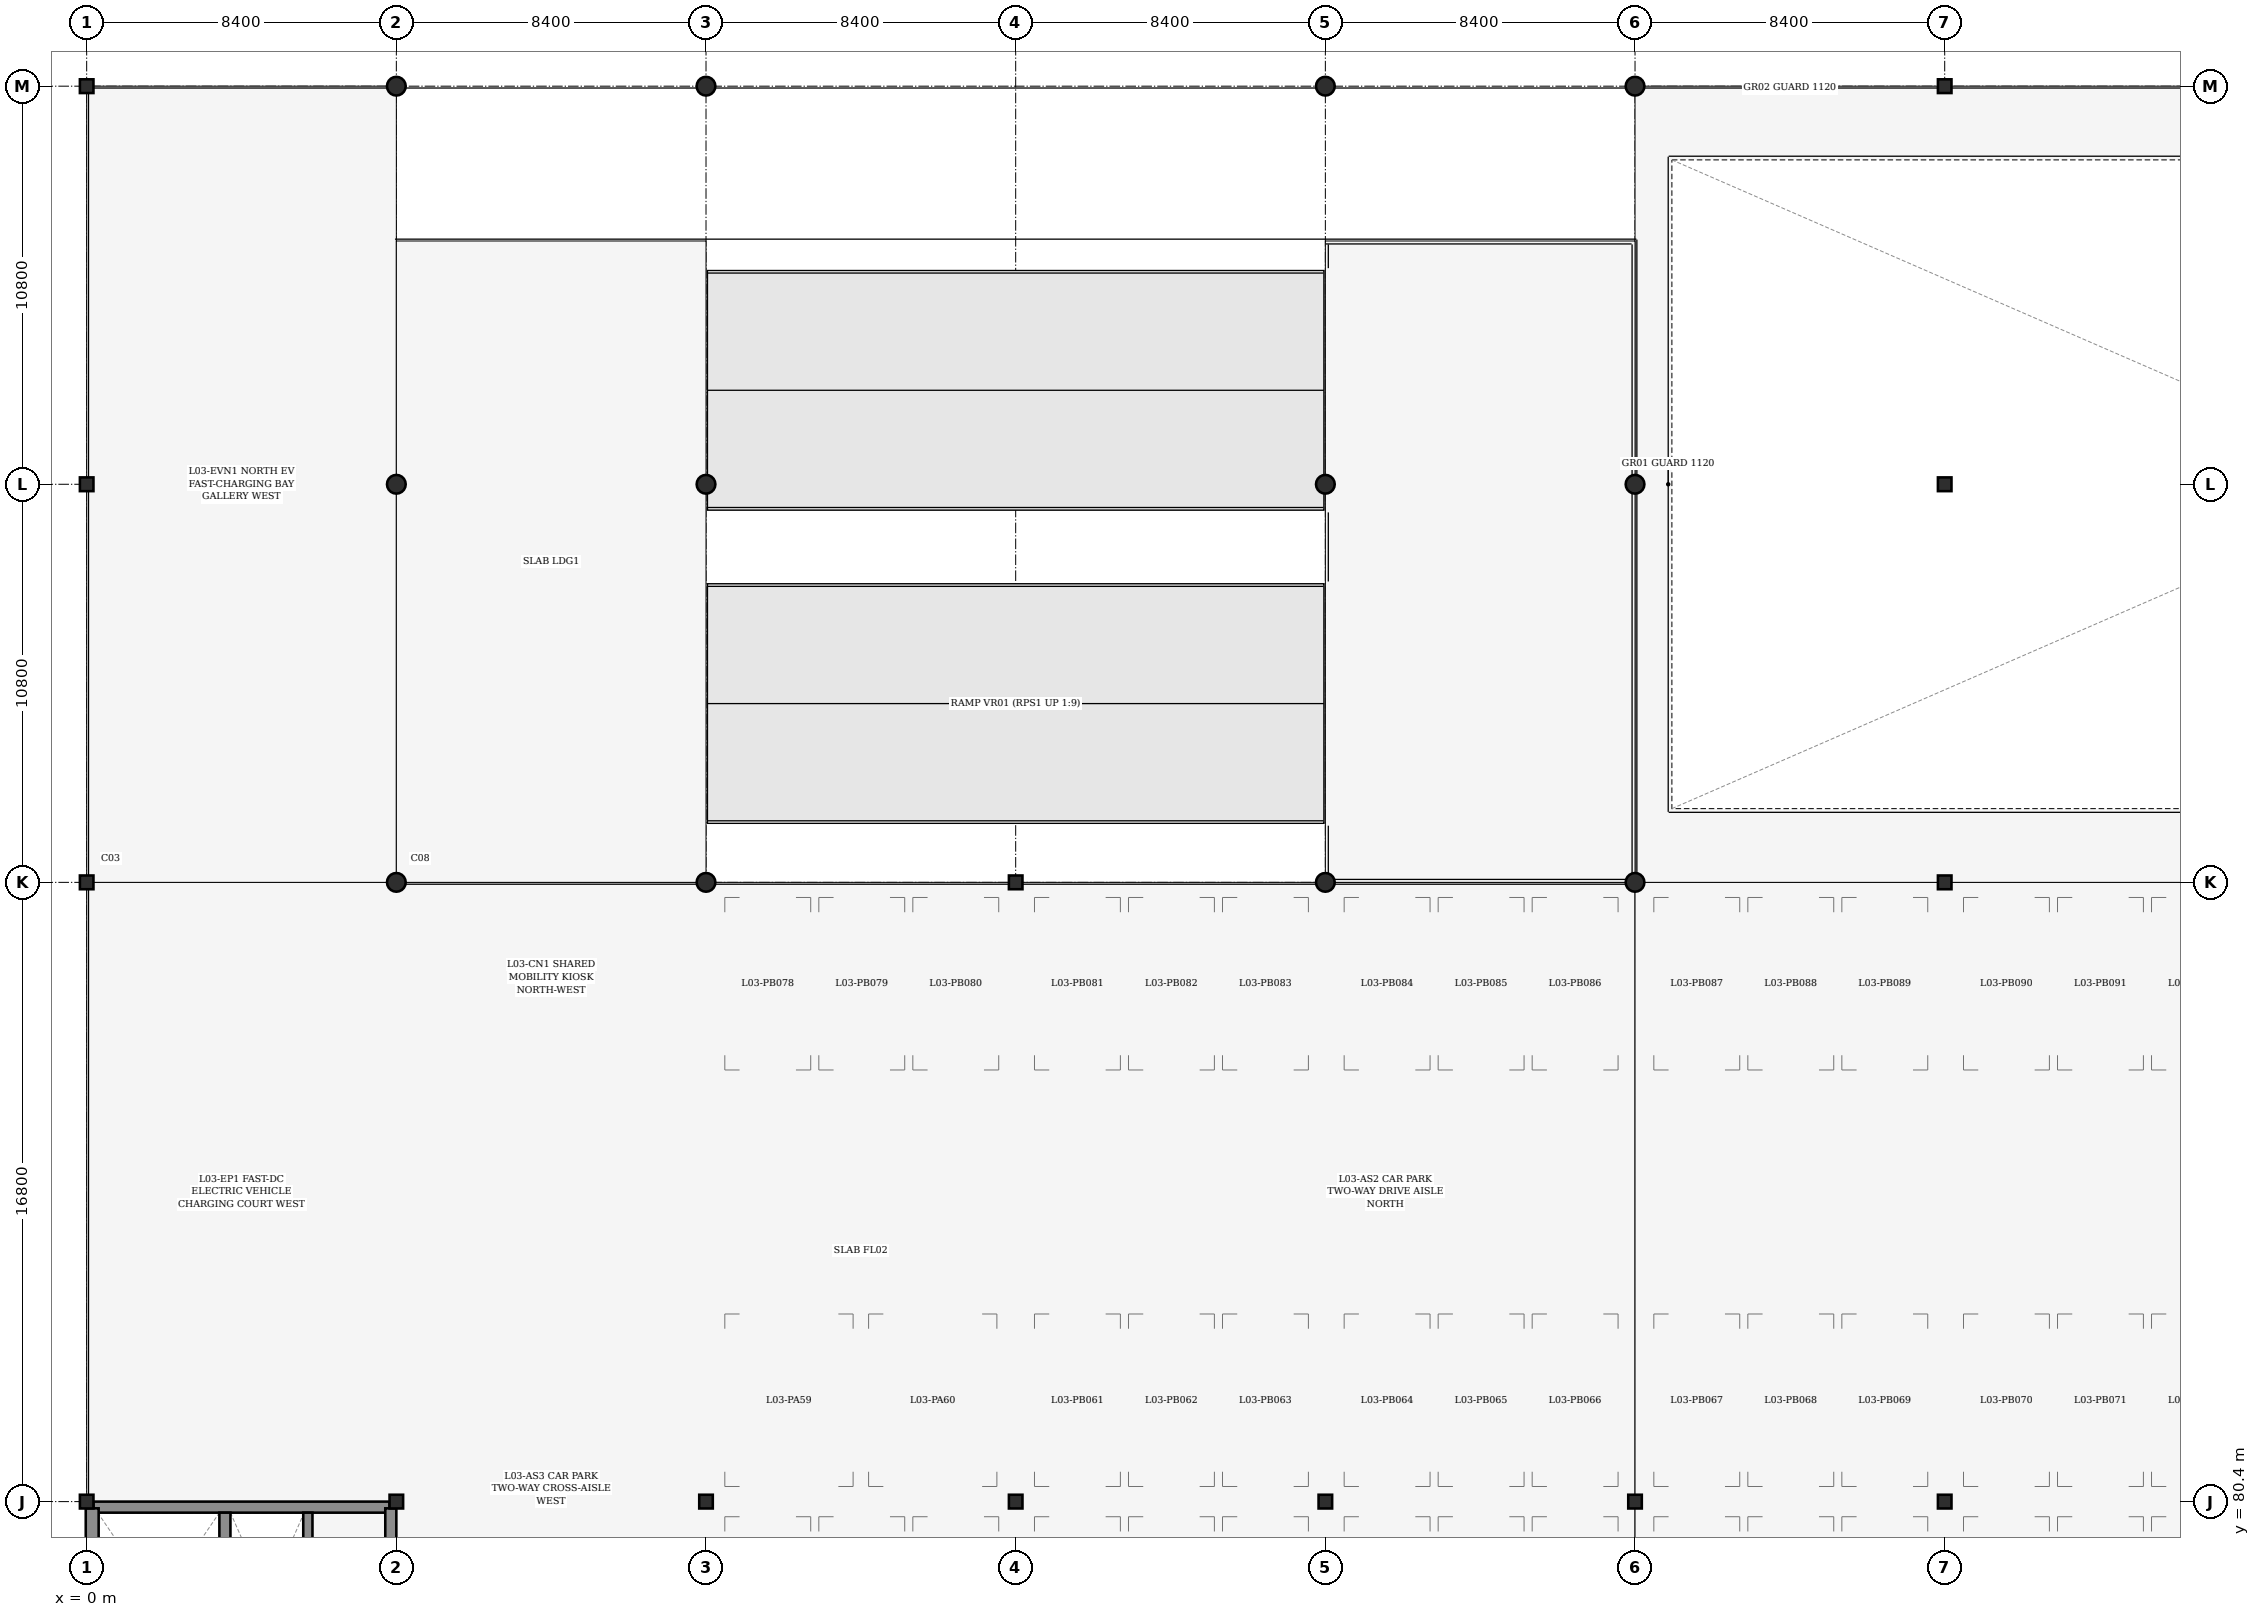
"""IFC4 building model, lengths in metres.
Left out: names, types, materials, properties, quantities, classifications, styles, units other than length and angle.
Written with IfcOpenShell. Run it as: python <this file> out.ifc"""

import sys

from ifc_helpers import new_model, si_unit, direction, frame, frame_2d, origin, origin_2d, place, context, subcontext, project, spatial, rectangle, hollow_circle, i_section, extrude, element, save


model = new_model("IFC4")
c1 = context("Model", 3, precision=1e-05, world=origin(), true_north=direction((0.0, 1.0)))
c2 = subcontext(c1, "Body", "Model", "MODEL_VIEW")
j1 = project(units=[si_unit("LENGTHUNIT", "METRE"), si_unit("PLANEANGLEUNIT", "RADIAN")], contexts=[c1])
p1 = place(None, origin())
s1 = spatial("IfcSite", under=j1, at=p1, CompositionType="ELEMENT")
p2 = place(p1, origin())
s2 = spatial("IfcBuilding", under=s1, at=p2, CompositionType="ELEMENT")
p3 = place(p2, frame((0.0, 0.0, 12.6)))
s3 = spatial("IfcBuildingStorey", under=s2, at=p3, CompositionType="ELEMENT", Elevation=12.6)
for number, where, z_axis, x_axis in (
    (1, (0.0, 80.4, 0.0), (0.0, 0.0, 1.0), (1.0, 0.0, 0.0)),
    (2, (0.0, 97.2, 0.0), (0.0, 0.0, 1.0), (1.0, 0.0, 0.0)),
    (3, (0.0, 108.0, 0.0), (0.0, 0.0, 1.0), (1.0, 0.0, 0.0)),
    (4, (0.0, 118.8, 0.0), (0.0, 0.0, 1.0), (1.0, 0.0, 0.0)),
    (5, (8.4, 80.4, 0.0), (0.0, 0.0, 1.0), (1.0, 0.0, 0.0)),
):
    element("IfcColumn", number, at=place(p3, frame(where, z_axis=z_axis, x_axis=x_axis)), inside=s3, PredefinedType="COLUMN", context=c2, shape_type="SweptSolid", body=[
        extrude(i_section(OverallWidth=0.373, OverallDepth=0.368, WebThickness=0.014, FlangeThickness=0.024, FilletRadius=0.015, at=origin_2d()), origin(), (0.0, 0.0, 1.0), 3.6),
    ])
for number, where, z_axis, x_axis in (
    (6, (8.4, 97.2, 0.0), (0.0, 0.0, 1.0), (1.0, 0.0, 0.0)),
    (7, (8.4, 108.0, 0.0), (0.0, 0.0, 1.0), (1.0, 0.0, 0.0)),
    (8, (8.4, 118.8, 0.0), (0.0, 0.0, 1.0), (1.0, 0.0, 0.0)),
):
    element("IfcColumn", number, at=place(p3, frame(where, z_axis=z_axis, x_axis=x_axis)), inside=s3, PredefinedType="COLUMN", context=c2, shape_type="SweptSolid", body=[
        extrude(hollow_circle(Radius=0.254, WallThickness=0.016, at=origin_2d()), origin(), (0.0, 0.0, 1.0), 3.6),
    ])
p4 = place(p3, frame((16.8, 80.4, 0.0), z_axis=(0.0, 0.0, 1.0), x_axis=(1.0, 0.0, 0.0)))
e9 = element("IfcColumn", 9, at=p4, inside=s3, PredefinedType="COLUMN", context=c2, shape_type="SweptSolid", body=[
    extrude(i_section(OverallWidth=0.373, OverallDepth=0.368, WebThickness=0.014, FlangeThickness=0.024, FilletRadius=0.015, at=origin_2d()), origin(), (0.0, 0.0, 1.0), 3.6),
])
for number, where, z_axis, x_axis in (
    (10, (16.8, 97.2, 0.0), (0.0, 0.0, 1.0), (1.0, 0.0, 0.0)),
    (11, (16.8, 108.0, 0.0), (0.0, 0.0, 1.0), (1.0, 0.0, 0.0)),
    (12, (16.8, 118.8, 0.0), (0.0, 0.0, 1.0), (1.0, 0.0, 0.0)),
):
    element("IfcColumn", number, at=place(p3, frame(where, z_axis=z_axis, x_axis=x_axis)), inside=s3, PredefinedType="COLUMN", context=c2, shape_type="SweptSolid", body=[
        extrude(hollow_circle(Radius=0.254, WallThickness=0.016, at=origin_2d()), origin(), (0.0, 0.0, 1.0), 3.6),
    ])
for number, where, z_axis, x_axis in (
    (13, (25.2, 80.4, 0.0), (0.0, 0.0, 1.0), (1.0, 0.0, 0.0)),
    (14, (25.2, 97.2, 0.0), (0.0, 0.0, 1.0), (1.0, 0.0, 0.0)),
    (15, (33.6, 80.4, 0.0), (0.0, 0.0, 1.0), (1.0, 0.0, 0.0)),
):
    element("IfcColumn", number, at=place(p3, frame(where, z_axis=z_axis, x_axis=x_axis)), inside=s3, PredefinedType="COLUMN", context=c2, shape_type="SweptSolid", body=[
        extrude(i_section(OverallWidth=0.373, OverallDepth=0.368, WebThickness=0.014, FlangeThickness=0.024, FilletRadius=0.015, at=origin_2d()), origin(), (0.0, 0.0, 1.0), 3.6),
    ])
for number, where, z_axis, x_axis in (
    (16, (33.6, 97.2, 0.0), (0.0, 0.0, 1.0), (1.0, 0.0, 0.0)),
    (17, (33.6, 108.0, 0.0), (0.0, 0.0, 1.0), (1.0, 0.0, 0.0)),
    (18, (33.6, 118.8, 0.0), (0.0, 0.0, 1.0), (1.0, 0.0, 0.0)),
):
    element("IfcColumn", number, at=place(p3, frame(where, z_axis=z_axis, x_axis=x_axis)), inside=s3, PredefinedType="COLUMN", context=c2, shape_type="SweptSolid", body=[
        extrude(hollow_circle(Radius=0.254, WallThickness=0.016, at=origin_2d()), origin(), (0.0, 0.0, 1.0), 3.6),
    ])
p5 = place(p3, frame((42.0, 80.4, 0.0), z_axis=(0.0, 0.0, 1.0), x_axis=(1.0, 0.0, 0.0)))
e19 = element("IfcColumn", 19, at=p5, inside=s3, PredefinedType="COLUMN", context=c2, shape_type="SweptSolid", body=[
    extrude(i_section(OverallWidth=0.373, OverallDepth=0.368, WebThickness=0.014, FlangeThickness=0.024, FilletRadius=0.015, at=origin_2d()), origin(), (0.0, 0.0, 1.0), 3.6),
])
for number, where, z_axis, x_axis in (
    (20, (42.0, 97.2, 0.0), (0.0, 0.0, 1.0), (1.0, 0.0, 0.0)),
    (21, (42.0, 108.0, 0.0), (0.0, 0.0, 1.0), (1.0, 0.0, 0.0)),
    (22, (42.0, 118.8, 0.0), (0.0, 0.0, 1.0), (1.0, 0.0, 0.0)),
):
    element("IfcColumn", number, at=place(p3, frame(where, z_axis=z_axis, x_axis=x_axis)), inside=s3, PredefinedType="COLUMN", context=c2, shape_type="SweptSolid", body=[
        extrude(hollow_circle(Radius=0.254, WallThickness=0.016, at=origin_2d()), origin(), (0.0, 0.0, 1.0), 3.6),
    ])
for number, where, z_axis, x_axis in (
    (23, (50.4, 80.4, 0.0), (0.0, 0.0, 1.0), (1.0, 0.0, 0.0)),
    (24, (50.4, 97.2, 0.0), (0.0, 0.0, 1.0), (1.0, 0.0, 0.0)),
    (25, (50.4, 108.0, 0.0), (0.0, 0.0, 1.0), (1.0, 0.0, 0.0)),
    (26, (50.4, 118.8, 0.0), (0.0, 0.0, 1.0), (1.0, 0.0, 0.0)),
):
    element("IfcColumn", number, at=place(p3, frame(where, z_axis=z_axis, x_axis=x_axis)), inside=s3, PredefinedType="COLUMN", context=c2, shape_type="SweptSolid", body=[
        extrude(i_section(OverallWidth=0.373, OverallDepth=0.368, WebThickness=0.014, FlangeThickness=0.024, FilletRadius=0.015, at=origin_2d()), origin(), (0.0, 0.0, 1.0), 3.6),
    ])
p6 = place(p3, frame((0.185, 80.25, 0.0), z_axis=(0.0, 0.0, 1.0), x_axis=(1.0, 0.0, 0.0)))
e27 = element("IfcWall", 27, at=p6, inside=s3, PredefinedType="SHEAR", context=c2, shape_type="SweptSolid", body=[
    extrude(rectangle(XDim=8.031, YDim=0.3, at=frame_2d((4.016, 0.0))), origin(), (0.0, 0.0, 1.0), 3.38),
])
p7 = place(p3, frame((0.15, 63.782, 0.0), z_axis=(0.0, 0.0, 1.0), x_axis=(0.0, 1.0, 0.0)))
e28 = element("IfcWall", 28, at=p7, inside=s3, PredefinedType="SHEAR", context=c2, shape_type="SweptSolid", body=[
    extrude(rectangle(XDim=16.436, YDim=0.35, at=frame_2d((8.218, 0.0))), origin(), (0.0, 0.0, 1.0), 3.38),
])
p8 = place(p3, frame((8.25, 63.782, 0.0), z_axis=(0.0, 0.0, 1.0), x_axis=(0.0, 1.0, 0.0)))
e29 = element("IfcWall", 29, at=p8, inside=s3, PredefinedType="SHEAR", context=c2, shape_type="SweptSolid", body=[
    extrude(rectangle(XDim=16.436, YDim=0.3, at=frame_2d((8.218, 0.0))), origin(), (0.0, 0.0, 1.0), 3.38),
])
p9 = place(p8, frame((5.668, 0.0, 0.0)))
e30 = element("IfcOpeningElement", 30, at=p9, cuts=e29, PredefinedType="OPENING", context=c2, shape_type="SweptSolid", body=[
    extrude(rectangle(XDim=1.25, YDim=2.15, at=frame_2d((0.625, 1.075))), frame((0.0, 0.16, 0.0), z_axis=(0.0, -1.0, 0.0), x_axis=(1.0, 0.0, 0.0)), (0.0, 0.0, 1.0), 0.32),
])
p10 = place(p3, frame((3.75, 63.9, 0.0), z_axis=(0.0, 0.0, 1.0), x_axis=(0.0, 1.0, 0.0)))
e31 = element("IfcWall", 31, at=p10, inside=s3, PredefinedType="SHEAR", context=c2, shape_type="SweptSolid", body=[
    extrude(rectangle(XDim=16.2, YDim=0.3, at=frame_2d((8.1, 0.0))), origin(), (0.0, 0.0, 1.0), 3.38),
])
p11 = place(p10, frame((0.5, 0.0, 0.0)))
e32 = element("IfcOpeningElement", 32, at=p11, cuts=e31, PredefinedType="OPENING", context=c2, shape_type="SweptSolid", body=[
    extrude(rectangle(XDim=1.15, YDim=2.15, at=frame_2d((0.575, 1.075))), frame((0.0, 0.16, 0.0), z_axis=(0.0, -1.0, 0.0), x_axis=(1.0, 0.0, 0.0)), (0.0, 0.0, 1.0), 0.32),
])
p12 = place(p3, frame((6.0, 75.55, 0.0), z_axis=(0.0, 0.0, 1.0), x_axis=(0.0, 1.0, 0.0)))
e33 = element("IfcWall", 33, at=p12, inside=s3, PredefinedType="PARTITIONING", context=c2, shape_type="SweptSolid", body=[
    extrude(rectangle(XDim=4.55, YDim=0.25, at=frame_2d((2.275, 0.0))), origin(), (0.0, 0.0, 1.0), 2.525),
])
save(model, sys.argv[1])
